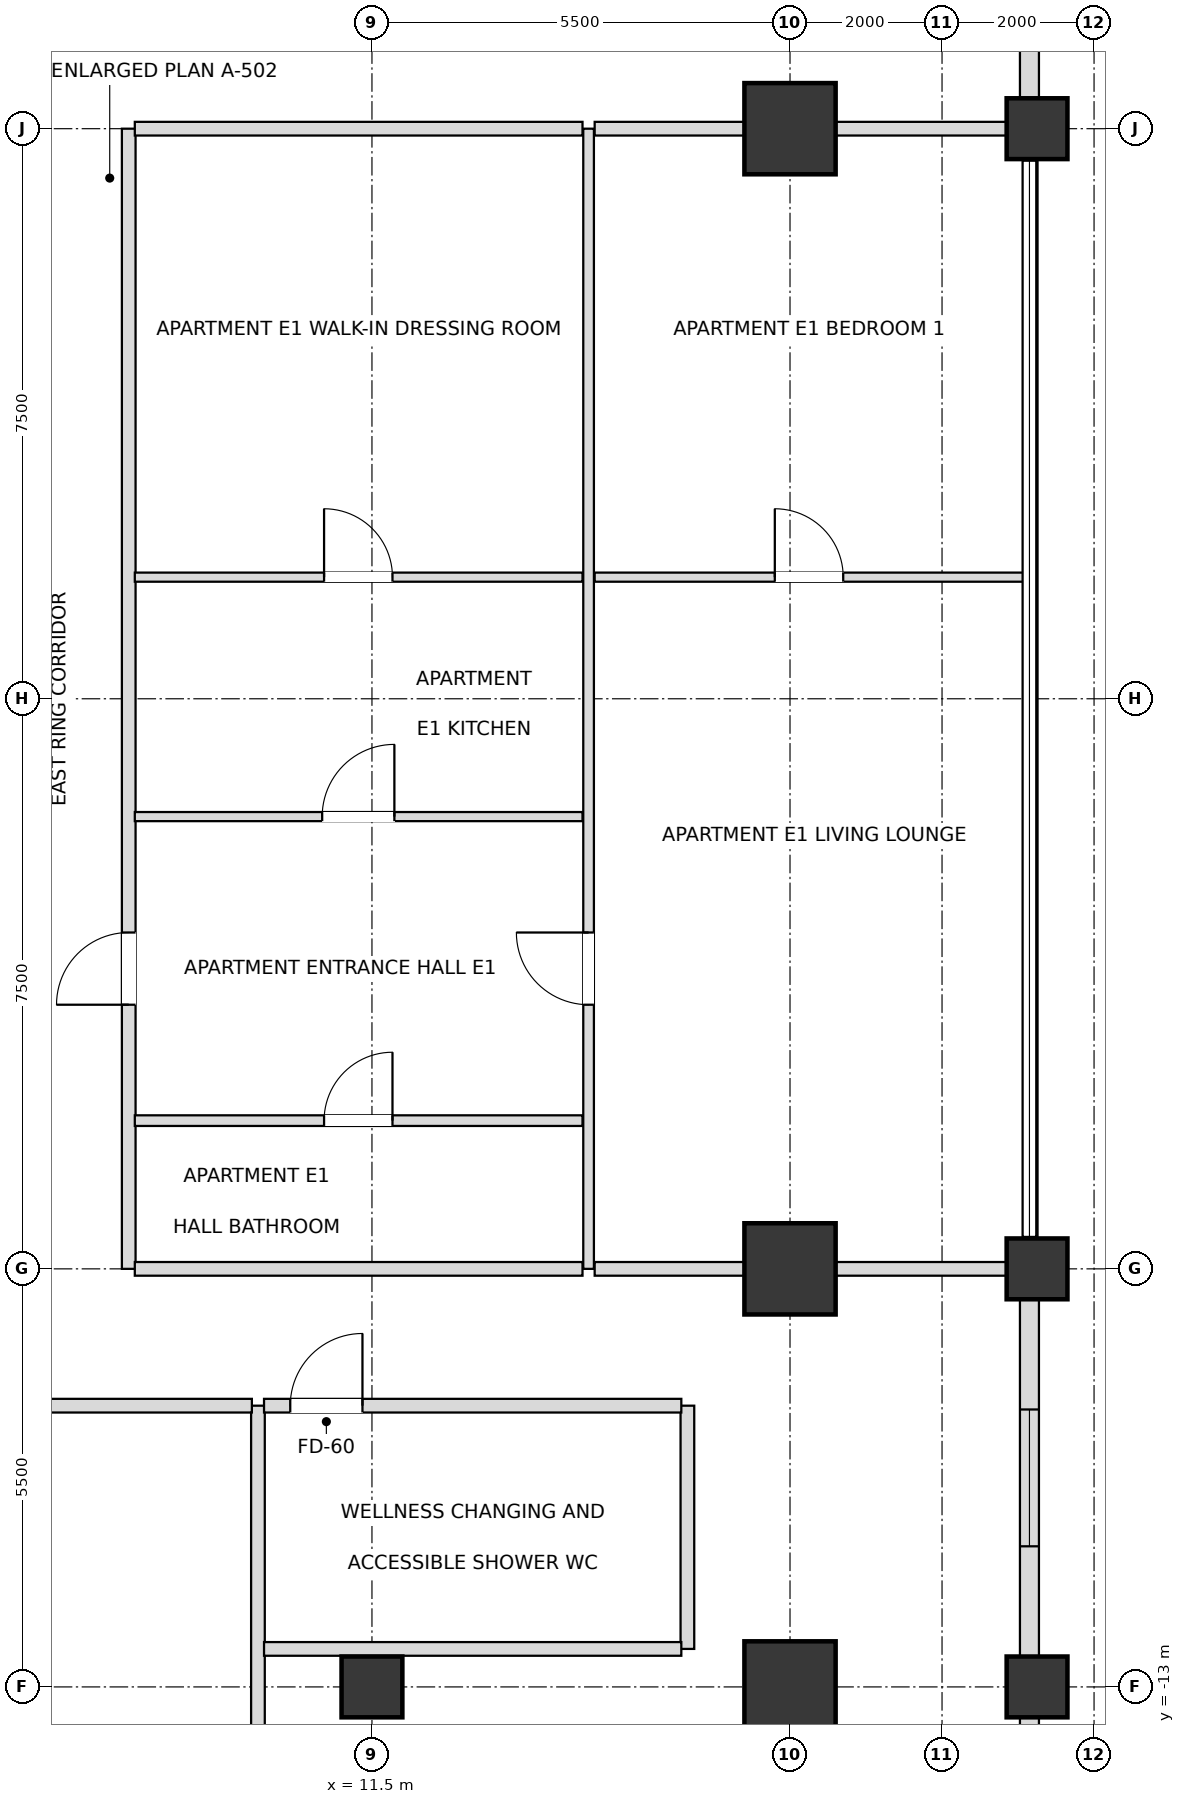
"""IFC4 building model, lengths in metres.
Left out: names, types, materials, properties, quantities, classifications, styles, units other than length and angle.
Written with IfcOpenShell. Run it as: python <this file> out.ifc"""

import sys

from ifc_helpers import new_model, si_unit, direction, frame, frame_2d, origin, origin_2d, place, context, subcontext, project, spatial, rectangle, extrude, element, fill, save


model = new_model("IFC4")
c1 = context("Model", 3, precision=1e-05, world=origin(), true_north=direction((0.0, 1.0)))
c2 = subcontext(c1, "Body", "Model", "MODEL_VIEW")
j1 = project(units=[si_unit("LENGTHUNIT", "METRE"), si_unit("PLANEANGLEUNIT", "RADIAN")], contexts=[c1])
p1 = place(None, origin())
s1 = spatial("IfcSite", under=j1, at=p1, CompositionType="ELEMENT")
p2 = place(p1, origin())
s2 = spatial("IfcBuilding", under=s1, at=p2, CompositionType="ELEMENT")
p3 = place(p2, frame((0.0, 0.0, 113.4)))
s3 = spatial("IfcBuildingStorey", under=s2, at=p3, CompositionType="ELEMENT", Elevation=113.4)
for number, where, z_axis, x_axis in (
    (1, (17.0, -13.0, 0.0), (0.0, 0.0, 1.0), (1.0, 0.0, 0.0)),
    (2, (17.0, -7.5, 0.0), (0.0, 0.0, 1.0), (1.0, 0.0, 0.0)),
    (3, (17.0, 7.5, 0.0), (0.0, 0.0, 1.0), (1.0, 0.0, 0.0)),
):
    element("IfcColumn", number, at=place(p3, frame(where, z_axis=z_axis, x_axis=x_axis)), inside=s3, PredefinedType="USERDEFINED", context=c2, shape_type="SweptSolid", body=[
        extrude(rectangle(XDim=1.2, YDim=1.2, at=origin_2d()), origin(), (0.0, 0.0, 1.0), 3.6),
    ])
for number, where, z_axis, x_axis in (
    (4, (11.5, -13.0, 0.0), (0.0, 0.0, 1.0), (1.0, 0.0, 0.0)),
    (5, (20.25, -13.0, 0.0), (0.0, 0.0, 1.0), (1.0, 0.0, 0.0)),
    (6, (20.25, -7.5, 0.0), (0.0, 0.0, 1.0), (1.0, 0.0, 0.0)),
    (7, (20.25, 7.5, 0.0), (0.0, 0.0, 1.0), (1.0, 0.0, 0.0)),
):
    element("IfcColumn", number, at=place(p3, frame(where, z_axis=z_axis, x_axis=x_axis)), inside=s3, PredefinedType="COLUMN", context=c2, shape_type="SweptSolid", body=[
        extrude(rectangle(XDim=0.8, YDim=0.8, at=origin_2d()), origin(), (0.0, 0.0, 1.0), 3.6),
    ])
p4 = place(p3, frame((20.15, -18.675, 0.0), z_axis=(0.0, 0.0, 1.0), x_axis=(0.0, 1.0, 0.0)))
e8 = element("IfcWall", 8, at=p4, inside=s3, PredefinedType="SOLIDWALL", context=c2, shape_type="SweptSolid", body=[
    extrude(rectangle(XDim=5.28, YDim=0.25, at=frame_2d((2.64, 0.0))), origin(), (0.0, 0.0, 1.0), 2.736),
])
p5 = place(p4, frame((1.718, 0.0, 0.72)))
e9 = element("IfcOpeningElement", 9, at=p5, cuts=e8, PredefinedType="OPENING", context=c2, shape_type="SweptSolid", body=[
    extrude(rectangle(XDim=1.8, YDim=1.68, at=frame_2d((0.9, 0.84))), frame((0.0, 0.135, 0.0), z_axis=(0.0, -1.0, 0.0), x_axis=(1.0, 0.0, 0.0)), (0.0, 0.0, 1.0), 0.27),
])
p6 = place(p3, frame((20.15, -12.605, 0.0), z_axis=(0.0, 0.0, 1.0), x_axis=(0.0, 1.0, 0.0)))
e10 = element("IfcWall", 10, at=p6, inside=s3, PredefinedType="SOLIDWALL", context=c2, shape_type="SweptSolid", body=[
    extrude(rectangle(XDim=4.71, YDim=0.25, at=frame_2d((2.355, 0.0))), origin(), (0.0, 0.0, 1.0), 2.736),
])
p7 = place(p6, frame((1.455, 0.0, 0.72)))
e11 = element("IfcOpeningElement", 11, at=p7, cuts=e10, PredefinedType="OPENING", context=c2, shape_type="SweptSolid", body=[
    extrude(rectangle(XDim=1.8, YDim=1.68, at=frame_2d((0.9, 0.84))), frame((0.0, 0.135, 0.0), z_axis=(0.0, -1.0, 0.0), x_axis=(1.0, 0.0, 0.0)), (0.0, 0.0, 1.0), 0.27),
])
p8 = place(p3, frame((20.15, 7.895, 0.0), z_axis=(0.0, 0.0, 1.0), x_axis=(0.0, 1.0, 0.0)))
e12 = element("IfcWall", 12, at=p8, inside=s3, PredefinedType="SOLIDWALL", context=c2, shape_type="SweptSolid", body=[
    extrude(rectangle(XDim=4.71, YDim=0.25, at=frame_2d((2.355, 0.0))), origin(), (0.0, 0.0, 1.0), 2.736),
])
p9 = place(p8, frame((1.455, 0.0, 0.72)))
e13 = element("IfcOpeningElement", 13, at=p9, cuts=e12, PredefinedType="OPENING", context=c2, shape_type="SweptSolid", body=[
    extrude(rectangle(XDim=1.8, YDim=1.68, at=frame_2d((0.9, 0.84))), frame((0.0, 0.135, 0.0), z_axis=(0.0, -1.0, 0.0), x_axis=(1.0, 0.0, 0.0)), (0.0, 0.0, 1.0), 0.27),
])
p10 = place(p3, frame((8.3, -7.5, 0.0), z_axis=(0.0, 0.0, 1.0), x_axis=(0.0, 1.0, 0.0)))
e14 = element("IfcWall", 14, at=p10, inside=s3, PredefinedType="PARTITIONING", context=c2, shape_type="SweptSolid", body=[
    extrude(rectangle(XDim=15.0, YDim=0.18, at=frame_2d((7.5, 0.0))), origin(), (0.0, 0.0, 1.0), 3.38),
])
p11 = place(p10, frame((3.475, 0.0, 0.0)))
e15 = element("IfcOpeningElement", 15, at=p11, cuts=e14, PredefinedType="OPENING", context=c2, shape_type="SweptSolid", body=[
    extrude(rectangle(XDim=0.95, YDim=2.15, at=frame_2d((0.475, 1.075))), frame((0.0, 0.1, 0.0), z_axis=(0.0, -1.0, 0.0), x_axis=(1.0, 0.0, 0.0)), (0.0, 0.0, 1.0), 0.2),
])
p12 = place(p3, frame((10.0, -23.15, 0.0), z_axis=(0.0, 0.0, 1.0), x_axis=(0.0, 1.0, 0.0)))
e16 = element("IfcWall", 16, at=p12, inside=s3, PredefinedType="PARTITIONING", context=c2, shape_type="SweptSolid", body=[
    extrude(rectangle(XDim=13.85, YDim=0.18, at=frame_2d((6.925, 0.0))), origin(), (0.0, 0.0, 1.0), 2.816),
])
p13 = place(p12, frame((4.855, 0.0, 0.0)))
e17 = element("IfcOpeningElement", 17, at=p13, cuts=e16, PredefinedType="OPENING", context=c2, shape_type="SweptSolid", body=[
    extrude(rectangle(XDim=0.95, YDim=2.15, at=frame_2d((0.475, 1.075))), frame((0.0, 0.1, 0.0), z_axis=(0.0, -1.0, 0.0), x_axis=(1.0, 0.0, 0.0)), (0.0, 0.0, 1.0), 0.2),
])
p14 = place(p3, frame((14.35, -7.5, 0.0), z_axis=(0.0, 0.0, 1.0), x_axis=(0.0, 1.0, 0.0)))
e18 = element("IfcWall", 18, at=p14, inside=s3, PredefinedType="PARTITIONING", context=c2, shape_type="SweptSolid", body=[
    extrude(rectangle(XDim=15.0, YDim=0.14, at=frame_2d((7.5, 0.0))), origin(), (0.0, 0.0, 1.0), 3.38),
])
p15 = place(p14, frame((3.475, 0.0, 0.0)))
e19 = element("IfcOpeningElement", 19, at=p15, cuts=e18, PredefinedType="OPENING", context=c2, shape_type="SweptSolid", body=[
    extrude(rectangle(XDim=0.95, YDim=2.1, at=frame_2d((0.475, 1.05))), frame((0.0, 0.08, 0.0), z_axis=(0.0, -1.0, 0.0), x_axis=(1.0, 0.0, 0.0)), (0.0, 0.0, 1.0), 0.16),
])
p16 = place(p3, frame((15.65, -12.5, 0.0), z_axis=(0.0, 0.0, 1.0), x_axis=(0.0, 1.0, 0.0)))
e20 = element("IfcWall", 20, at=p16, inside=s3, PredefinedType="PARTITIONING", context=c2, shape_type="SweptSolid", body=[
    extrude(rectangle(XDim=3.2, YDim=0.18, at=frame_2d((1.6, 0.0))), origin(), (0.0, 0.0, 1.0), 3.38),
])
p17 = place(p3, frame((10.08, -12.5, 0.0), z_axis=(0.0, 0.0, 1.0), x_axis=(1.0, 0.0, 0.0)))
e21 = element("IfcWall", 21, at=p17, inside=s3, PredefinedType="PARTITIONING", context=c2, shape_type="SweptSolid", body=[
    extrude(rectangle(XDim=5.49, YDim=0.18, at=frame_2d((2.745, 0.0))), origin(), (0.0, 0.0, 1.0), 3.38),
])
p18 = place(p3, frame((-4.92, -9.3, 0.0), z_axis=(0.0, 0.0, 1.0), x_axis=(1.0, 0.0, 0.0)))
e22 = element("IfcWall", 22, at=p18, inside=s3, PredefinedType="PARTITIONING", context=c2, shape_type="SweptSolid", body=[
    extrude(rectangle(XDim=14.84, YDim=0.18, at=frame_2d((7.42, 0.0))), origin(), (0.0, 0.0, 1.0), 2.816),
])
p19 = place(p18, frame((6.945, 0.0, 0.0)))
e23 = element("IfcOpeningElement", 23, at=p19, cuts=e22, PredefinedType="OPENING", context=c2, shape_type="SweptSolid", body=[
    extrude(rectangle(XDim=0.95, YDim=2.15, at=frame_2d((0.475, 1.075))), frame((0.0, 0.1, 0.0), z_axis=(0.0, -1.0, 0.0), x_axis=(1.0, 0.0, 0.0)), (0.0, 0.0, 1.0), 0.2),
])
p20 = place(p3, frame((10.08, -9.3, 0.0), z_axis=(0.0, 0.0, 1.0), x_axis=(1.0, 0.0, 0.0)))
e24 = element("IfcWall", 24, at=p20, inside=s3, PredefinedType="PARTITIONING", context=c2, shape_type="SweptSolid", body=[
    extrude(rectangle(XDim=5.49, YDim=0.18, at=frame_2d((2.745, 0.0))), origin(), (0.0, 0.0, 1.0), 3.38),
])
p21 = place(p20, frame((0.345, 0.0, 0.0)))
e25 = element("IfcOpeningElement", 25, at=p21, cuts=e24, PredefinedType="OPENING", context=c2, shape_type="SweptSolid", body=[
    extrude(rectangle(XDim=0.95, YDim=2.15, at=frame_2d((0.475, 1.075))), frame((0.0, 0.1, 0.0), z_axis=(0.0, -1.0, 0.0), x_axis=(1.0, 0.0, 0.0)), (0.0, 0.0, 1.0), 0.2),
])
p22 = place(p3, frame((8.38, -7.5, 0.0), z_axis=(0.0, 0.0, 1.0), x_axis=(1.0, 0.0, 0.0)))
e26 = element("IfcWall", 26, at=p22, inside=s3, PredefinedType="PARTITIONING", context=c2, shape_type="SweptSolid", body=[
    extrude(rectangle(XDim=5.89, YDim=0.18, at=frame_2d((2.945, 0.0))), origin(), (0.0, 0.0, 1.0), 2.816),
])
p23 = place(p3, frame((14.43, -7.5, 0.0), z_axis=(0.0, 0.0, 1.0), x_axis=(1.0, 0.0, 0.0)))
e27 = element("IfcWall", 27, at=p23, inside=s3, PredefinedType="PARTITIONING", context=c2, shape_type="SweptSolid", body=[
    extrude(rectangle(XDim=5.72, YDim=0.18, at=frame_2d((2.86, 0.0))), origin(), (0.0, 0.0, 1.0), 2.816),
])
p24 = place(p3, frame((8.38, -5.55, 0.0), z_axis=(0.0, 0.0, 1.0), x_axis=(1.0, 0.0, 0.0)))
e28 = element("IfcWall", 28, at=p24, inside=s3, PredefinedType="PARTITIONING", context=c2, shape_type="SweptSolid", body=[
    extrude(rectangle(XDim=5.89, YDim=0.14, at=frame_2d((2.945, 0.0))), origin(), (0.0, 0.0, 1.0), 3.38),
])
p25 = place(p24, frame((2.49, 0.0, 0.0)))
e29 = element("IfcOpeningElement", 29, at=p25, cuts=e28, PredefinedType="OPENING", context=c2, shape_type="SweptSolid", body=[
    extrude(rectangle(XDim=0.9, YDim=2.1, at=frame_2d((0.45, 1.05))), frame((0.0, 0.08, 0.0), z_axis=(0.0, -1.0, 0.0), x_axis=(1.0, 0.0, 0.0)), (0.0, 0.0, 1.0), 0.16),
])
p26 = place(p3, frame((8.38, -1.55, 0.0), z_axis=(0.0, 0.0, 1.0), x_axis=(1.0, 0.0, 0.0)))
e30 = element("IfcWall", 30, at=p26, inside=s3, PredefinedType="PARTITIONING", context=c2, shape_type="SweptSolid", body=[
    extrude(rectangle(XDim=5.89, YDim=0.12, at=frame_2d((2.945, 0.0))), origin(), (0.0, 0.0, 1.0), 3.38),
])
p27 = place(p26, frame((2.465, 0.0, 0.0)))
e31 = element("IfcOpeningElement", 31, at=p27, cuts=e30, PredefinedType="OPENING", context=c2, shape_type="SweptSolid", body=[
    extrude(rectangle(XDim=0.95, YDim=2.1, at=frame_2d((0.475, 1.05))), frame((0.0, 0.07, 0.0), z_axis=(0.0, -1.0, 0.0), x_axis=(1.0, 0.0, 0.0)), (0.0, 0.0, 1.0), 0.14),
])
p28 = place(p3, frame((8.38, 1.6, 0.0), z_axis=(0.0, 0.0, 1.0), x_axis=(1.0, 0.0, 0.0)))
e32 = element("IfcWall", 32, at=p28, inside=s3, PredefinedType="PARTITIONING", context=c2, shape_type="SweptSolid", body=[
    extrude(rectangle(XDim=5.89, YDim=0.12, at=frame_2d((2.945, 0.0))), origin(), (0.0, 0.0, 1.0), 3.38),
])
p29 = place(p28, frame((2.49, 0.0, 0.0)))
e33 = element("IfcOpeningElement", 33, at=p29, cuts=e32, PredefinedType="OPENING", context=c2, shape_type="SweptSolid", body=[
    extrude(rectangle(XDim=0.9, YDim=2.1, at=frame_2d((0.45, 1.05))), frame((0.0, 0.07, 0.0), z_axis=(0.0, -1.0, 0.0), x_axis=(1.0, 0.0, 0.0)), (0.0, 0.0, 1.0), 0.14),
])
p30 = place(p3, frame((14.43, 1.6, 0.0), z_axis=(0.0, 0.0, 1.0), x_axis=(1.0, 0.0, 0.0)))
e34 = element("IfcWall", 34, at=p30, inside=s3, PredefinedType="PARTITIONING", context=c2, shape_type="SweptSolid", body=[
    extrude(rectangle(XDim=5.64, YDim=0.12, at=frame_2d((2.82, 0.0))), origin(), (0.0, 0.0, 1.0), 2.816),
])
p31 = place(p30, frame((2.37, 0.0, 0.0)))
e35 = element("IfcOpeningElement", 35, at=p31, cuts=e34, PredefinedType="OPENING", context=c2, shape_type="SweptSolid", body=[
    extrude(rectangle(XDim=0.9, YDim=2.1, at=frame_2d((0.45, 1.05))), frame((0.0, 0.07, 0.0), z_axis=(0.0, -1.0, 0.0), x_axis=(1.0, 0.0, 0.0)), (0.0, 0.0, 1.0), 0.14),
])
p32 = place(p3, frame((8.38, 7.5, 0.0), z_axis=(0.0, 0.0, 1.0), x_axis=(1.0, 0.0, 0.0)))
e36 = element("IfcWall", 36, at=p32, inside=s3, PredefinedType="PARTITIONING", context=c2, shape_type="SweptSolid", body=[
    extrude(rectangle(XDim=5.89, YDim=0.18, at=frame_2d((2.945, 0.0))), origin(), (0.0, 0.0, 1.0), 2.816),
])
p33 = place(p3, frame((14.43, 7.5, 0.0), z_axis=(0.0, 0.0, 1.0), x_axis=(1.0, 0.0, 0.0)))
e37 = element("IfcWall", 37, at=p33, inside=s3, PredefinedType="PARTITIONING", context=c2, shape_type="SweptSolid", body=[
    extrude(rectangle(XDim=5.72, YDim=0.18, at=frame_2d((2.86, 0.0))), origin(), (0.0, 0.0, 1.0), 2.816),
])
p34 = place(p7, origin())
e38 = element("IfcWindow", 38, at=p34, inside=s3, PartitioningType="SINGLE_PANEL", PredefinedType="WINDOW", context=c2, shape_type="SweptSolid", body=[
    extrude(rectangle(XDim=1.8, YDim=1.68, at=frame_2d((0.9, 0.84))), frame((0.0, 0.03, 0.0), z_axis=(0.0, -1.0, 0.0), x_axis=(1.0, 0.0, 0.0)), (0.0, 0.0, 1.0), 0.06),
])
fill(e11, e38)
p35 = place(p21, origin())
e39 = element("IfcDoor", 39, at=p35, inside=s3, OperationType="SINGLE_SWING_RIGHT", PredefinedType="DOOR", context=c2, shape_type="SweptSolid", body=[
    extrude(rectangle(XDim=0.95, YDim=2.15, at=frame_2d((0.475, 1.075))), frame((0.0, 0.025, 0.0), z_axis=(0.0, -1.0, 0.0), x_axis=(1.0, 0.0, 0.0)), (0.0, 0.0, 1.0), 0.05),
])
fill(e25, e39)
p36 = place(p25, origin())
e40 = element("IfcDoor", 40, at=p36, inside=s3, OperationType="SINGLE_SWING_RIGHT", PredefinedType="DOOR", context=c2, shape_type="SweptSolid", body=[
    extrude(rectangle(XDim=0.9, YDim=2.1, at=frame_2d((0.45, 1.05))), frame((0.0, 0.025, 0.0), z_axis=(0.0, -1.0, 0.0), x_axis=(1.0, 0.0, 0.0)), (0.0, 0.0, 1.0), 0.05),
])
fill(e29, e40)
p37 = place(p11, origin())
e41 = element("IfcDoor", 41, at=p37, inside=s3, OperationType="SINGLE_SWING_LEFT", PredefinedType="DOOR", context=c2, shape_type="SweptSolid", body=[
    extrude(rectangle(XDim=0.95, YDim=2.15, at=frame_2d((0.475, 1.075))), frame((0.0, 0.025, 0.0), z_axis=(0.0, -1.0, 0.0), x_axis=(1.0, 0.0, 0.0)), (0.0, 0.0, 1.0), 0.05),
])
fill(e15, e41)
p38 = place(p27, origin())
e42 = element("IfcDoor", 42, at=p38, inside=s3, OperationType="SINGLE_SWING_RIGHT", PredefinedType="DOOR", context=c2, shape_type="SweptSolid", body=[
    extrude(rectangle(XDim=0.95, YDim=2.1, at=frame_2d((0.475, 1.05))), frame((0.0, 0.025, 0.0), z_axis=(0.0, -1.0, 0.0), x_axis=(1.0, 0.0, 0.0)), (0.0, 0.0, 1.0), 0.05),
])
fill(e31, e42)
p39 = place(p29, origin())
e43 = element("IfcDoor", 43, at=p39, inside=s3, OperationType="SINGLE_SWING_LEFT", PredefinedType="DOOR", context=c2, shape_type="SweptSolid", body=[
    extrude(rectangle(XDim=0.9, YDim=2.1, at=frame_2d((0.45, 1.05))), frame((0.0, 0.025, 0.0), z_axis=(0.0, -1.0, 0.0), x_axis=(1.0, 0.0, 0.0)), (0.0, 0.0, 1.0), 0.05),
])
fill(e33, e43)
p40 = place(p15, origin())
e44 = element("IfcDoor", 44, at=p40, inside=s3, OperationType="SINGLE_SWING_RIGHT", PredefinedType="DOOR", context=c2, shape_type="SweptSolid", body=[
    extrude(rectangle(XDim=0.95, YDim=2.1, at=frame_2d((0.475, 1.05))), frame((0.0, 0.025, 0.0), z_axis=(0.0, -1.0, 0.0), x_axis=(1.0, 0.0, 0.0)), (0.0, 0.0, 1.0), 0.05),
])
fill(e19, e44)
p41 = place(p31, origin())
e45 = element("IfcDoor", 45, at=p41, inside=s3, OperationType="SINGLE_SWING_LEFT", PredefinedType="DOOR", context=c2, shape_type="SweptSolid", body=[
    extrude(rectangle(XDim=0.9, YDim=2.1, at=frame_2d((0.45, 1.05))), frame((0.0, 0.025, 0.0), z_axis=(0.0, -1.0, 0.0), x_axis=(1.0, 0.0, 0.0)), (0.0, 0.0, 1.0), 0.05),
])
fill(e35, e45)
save(model, sys.argv[1])
